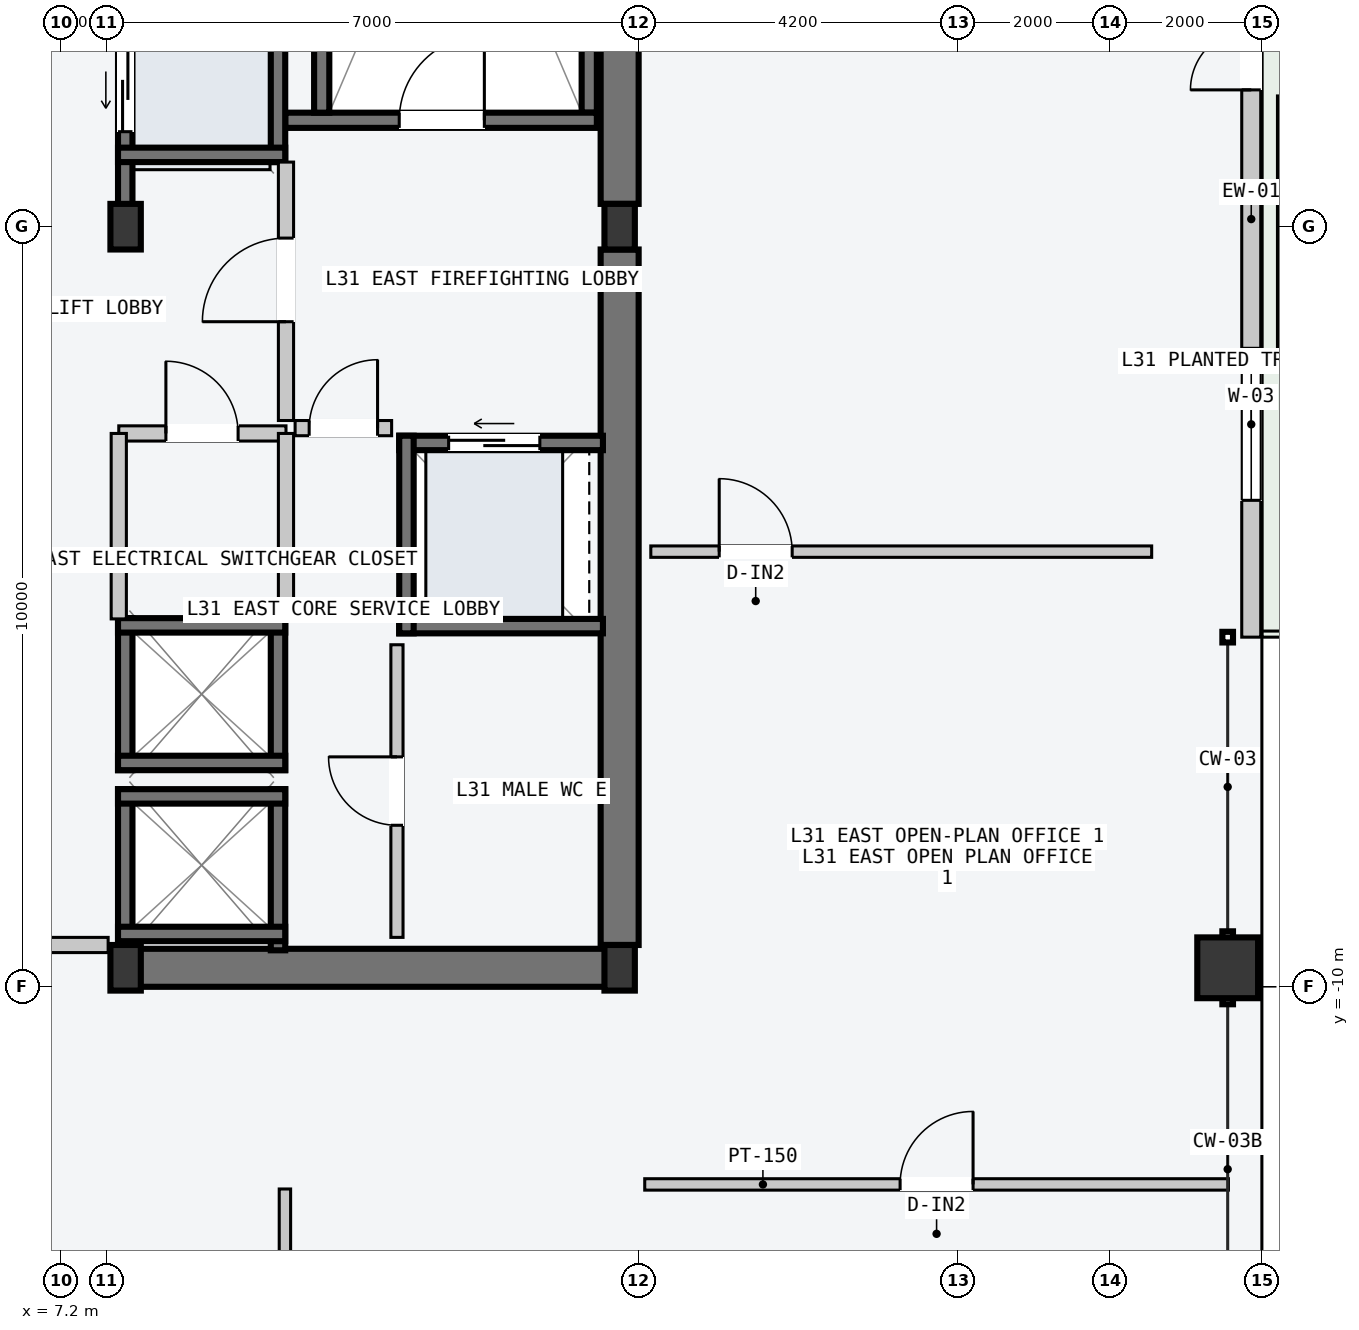
"""IFC4 building model, lengths in metres.
Left out: names, types, materials, properties, quantities, classifications, styles, units other than length and angle.
Written with IfcOpenShell. Run it as: python <this file> out.ifc"""

import sys

from ifc_helpers import new_model, si_unit, direction, frame, frame_2d, origin, origin_2d, place, context, subcontext, project, spatial, rectangle, hollow_rectangle, i_section, extrude, element, fill, save


model = new_model("IFC4")
c1 = context("Model", 3, precision=1e-05, world=origin(), true_north=direction((0.0, 1.0)))
c2 = subcontext(c1, "Body", "Model", "MODEL_VIEW")
j1 = project(units=[si_unit("LENGTHUNIT", "METRE"), si_unit("PLANEANGLEUNIT", "RADIAN")], contexts=[c1])
p1 = place(None, origin())
s1 = spatial("IfcSite", under=j1, at=p1, CompositionType="ELEMENT")
p2 = place(p1, origin())
s2 = spatial("IfcBuilding", under=s1, at=p2, CompositionType="ELEMENT")
p3 = place(p2, frame((0.0, 0.0, 120.6)))
s3 = spatial("IfcBuildingStorey", under=s2, at=p3, CompositionType="ELEMENT", Elevation=120.6)
p4 = place(p3, frame((8.07, -9.75, -0.2), z_axis=(0.0, 0.0, 1.0), x_axis=(1.0, 0.0, 0.0)))
e1 = element("IfcWall", 1, at=p4, inside=s3, PredefinedType="SHEAR", context=c2, shape_type="SweptSolid", body=[
    extrude(rectangle(XDim=6.46, YDim=0.5, at=frame_2d((3.23, 0.0))), origin(), (0.0, 0.0, 1.0), 3.6),
])
for number, where, z_axis, x_axis in (
    (2, (14.55, -9.45, -0.2), (0.0, 0.0, 1.0), (0.0, 1.0, 0.0)),
    (3, (14.55, 0.3, -0.2), (0.0, 0.0, 1.0), (0.0, 1.0, 0.0)),
):
    element("IfcWall", number, at=place(p3, frame(where, z_axis=z_axis, x_axis=x_axis)), inside=s3, PredefinedType="SHEAR", context=c2, shape_type="SweptSolid", body=[
        extrude(rectangle(XDim=9.15, YDim=0.5, at=frame_2d((4.575, 0.0))), origin(), (0.0, 0.0, 1.0), 3.6),
    ])
p5 = place(p3, frame((14.15, 1.5, -0.2), z_axis=(0.0, 0.0, 1.0), x_axis=(0.0, 1.0, 0.0)))
e4 = element("IfcWall", 4, at=p5, inside=s3, PredefinedType="SOLIDWALL", context=c2, shape_type="SweptSolid", body=[
    extrude(rectangle(XDim=7.8, YDim=0.2, at=frame_2d((3.9, 0.0))), origin(), (0.0, 0.0, 1.0), 3.6),
])
p6 = place(p3, frame((10.15, 1.4, -0.2), z_axis=(0.0, 0.0, 1.0), x_axis=(1.0, 0.0, 0.0)))
e5 = element("IfcWall", 5, at=p6, inside=s3, PredefinedType="SOLIDWALL", context=c2, shape_type="SweptSolid", body=[
    extrude(rectangle(XDim=4.1, YDim=0.2, at=frame_2d((2.05, 0.0))), origin(), (0.0, 0.0, 1.0), 3.6),
])
p7 = place(p6, frame((1.5, 0.0, 0.2)))
e6 = element("IfcOpeningElement", 6, at=p7, cuts=e5, PredefinedType="OPENING", context=c2, shape_type="SweptSolid", body=[
    extrude(rectangle(XDim=1.12, YDim=2.18, at=frame_2d((0.56, 1.09))), frame((0.0, 0.11, 0.0), z_axis=(0.0, -1.0, 0.0), x_axis=(1.0, 0.0, 0.0)), (0.0, 0.0, 1.0), 0.22),
])
p8 = place(p3, frame((10.63, 1.5, -0.2), z_axis=(0.0, 0.0, 1.0), x_axis=(0.0, 1.0, 0.0)))
e7 = element("IfcWall", 7, at=p8, inside=s3, PredefinedType="SOLIDWALL", context=c2, shape_type="SweptSolid", body=[
    extrude(rectangle(XDim=7.8, YDim=0.2, at=frame_2d((3.9, 0.0))), origin(), (0.0, 0.0, 1.0), 3.6),
])
for number, where, z_axis, x_axis in (
    (8, (8.05, -9.75, 0.0), (0.0, 0.0, 1.0), (1.0, 0.0, 0.0)),
    (9, (8.05, 0.0, 0.0), (0.0, 0.0, 1.0), (1.0, 0.0, 0.0)),
    (10, (14.55, -9.75, 0.0), (0.0, 0.0, 1.0), (1.0, 0.0, 0.0)),
    (11, (14.55, 0.0, 0.0), (0.0, 0.0, 1.0), (1.0, 0.0, 0.0)),
):
    element("IfcColumn", number, at=place(p3, frame(where, z_axis=z_axis, x_axis=x_axis)), inside=s3, PredefinedType="COLUMN", context=c2, shape_type="SweptSolid", body=[
        extrude(i_section(OverallWidth=0.4, OverallDepth=0.6, WebThickness=0.022, FlangeThickness=0.036, at=origin_2d()), origin(), (0.0, 0.0, 1.0), 3.6),
    ])
p9 = place(p3, frame((22.55, -9.75, 0.0), z_axis=(0.0, 0.0, 1.0), x_axis=(0.0, 1.0, 0.0)))
e12 = element("IfcColumn", 12, at=p9, inside=s3, PredefinedType="COLUMN", context=c2, shape_type="SweptSolid", body=[
    extrude(hollow_rectangle(XDim=0.8, YDim=0.8, WallThickness=0.036, at=origin_2d()), origin(), (0.0, 0.0, 1.0), 3.6),
])
p10 = place(p3, frame((22.86, -5.4, 0.0), z_axis=(0.0, 0.0, 1.0), x_axis=(0.0, 1.0, 0.0)))
e13 = element("IfcWall", 13, at=p10, inside=s3, PredefinedType="STANDARD", context=c2, shape_type="SweptSolid", body=[
    extrude(rectangle(XDim=10.8, YDim=0.25, at=frame_2d((5.4, 0.0))), origin(), (0.0, 0.0, 1.0), 3.4),
])
p11 = place(p10, frame((7.2, 0.0, 0.0)))
e14 = element("IfcOpeningElement", 14, at=p11, cuts=e13, PredefinedType="OPENING", context=c2, shape_type="SweptSolid", body=[
    extrude(rectangle(XDim=1.6, YDim=2.2, at=frame_2d((0.8, 1.1))), frame((0.0, 0.135, 0.0), z_axis=(0.0, -1.0, 0.0), x_axis=(1.0, 0.0, 0.0)), (0.0, 0.0, 1.0), 0.27),
])
p12 = place(p10, frame((1.8, 0.0, 0.85)))
e15 = element("IfcOpeningElement", 15, at=p12, cuts=e13, PredefinedType="OPENING", context=c2, shape_type="SweptSolid", body=[
    extrude(rectangle(XDim=2.0, YDim=2.1, at=frame_2d((1.0, 1.05))), frame((0.0, 0.135, 0.0), z_axis=(0.0, -1.0, 0.0), x_axis=(1.0, 0.0, 0.0)), (0.0, 0.0, 1.0), 0.27),
])
p13 = place(p3, frame((8.045, 0.21, -0.2), z_axis=(0.0, 0.0, 1.0), x_axis=(0.0, 1.0, 0.0)))
e16 = element("IfcWall", 16, at=p13, inside=s3, PredefinedType="SOLIDWALL", context=c2, shape_type="SweptSolid", body=[
    extrude(rectangle(XDim=2.54, YDim=0.19, at=frame_2d((1.27, 0.0))), origin(), (0.0, 0.0, 1.0), 3.6),
])
p14 = place(p13, frame((1.04, 0.0, 0.2)))
e17 = element("IfcOpeningElement", 17, at=p14, cuts=e16, PredefinedType="OPENING", context=c2, shape_type="SweptSolid", body=[
    extrude(rectangle(XDim=1.1, YDim=2.2, at=frame_2d((0.55, 1.1))), frame((0.0, 0.105, 0.0), z_axis=(0.0, -1.0, 0.0), x_axis=(1.0, 0.0, 0.0)), (0.0, 0.0, 1.0), 0.21),
])
p15 = place(p3, frame((10.055, 0.85, -0.2), z_axis=(0.0, 0.0, 1.0), x_axis=(0.0, 1.0, 0.0)))
e18 = element("IfcWall", 18, at=p15, inside=s3, PredefinedType="SOLIDWALL", context=c2, shape_type="SweptSolid", body=[
    extrude(rectangle(XDim=1.9, YDim=0.19, at=frame_2d((0.95, 0.0))), origin(), (0.0, 0.0, 1.0), 3.6),
])
p16 = place(p3, frame((7.95, 0.945, -0.2), z_axis=(0.0, 0.0, 1.0), x_axis=(1.0, 0.0, 0.0)))
e19 = element("IfcWall", 19, at=p16, inside=s3, PredefinedType="SOLIDWALL", context=c2, shape_type="SweptSolid", body=[
    extrude(rectangle(XDim=2.2, YDim=0.19, at=frame_2d((1.1, 0.0))), origin(), (0.0, 0.0, 1.0), 3.6),
])
for number, where, z_axis, x_axis in (
    (20, (8.045, -9.52, -0.2), (0.0, 0.0, 1.0), (0.0, 1.0, 0.0)),
    (21, (10.055, -9.52, -0.2), (0.0, 0.0, 1.0), (0.0, 1.0, 0.0)),
):
    element("IfcWall", number, at=place(p3, frame(where, z_axis=z_axis, x_axis=x_axis)), inside=s3, PredefinedType="SOLIDWALL", context=c2, shape_type="SweptSolid", body=[
        extrude(rectangle(XDim=2.12, YDim=0.19, at=frame_2d((1.06, 0.0))), origin(), (0.0, 0.0, 1.0), 3.6),
    ])
for number, where, z_axis, x_axis in (
    (22, (7.95, -7.495, -0.2), (0.0, 0.0, 1.0), (1.0, 0.0, 0.0)),
    (23, (7.95, -9.305, -0.2), (0.0, 0.0, 1.0), (1.0, 0.0, 0.0)),
):
    element("IfcWall", number, at=place(p3, frame(where, z_axis=z_axis, x_axis=x_axis)), inside=s3, PredefinedType="SOLIDWALL", context=c2, shape_type="SweptSolid", body=[
        extrude(rectangle(XDim=2.2, YDim=0.19, at=frame_2d((1.1, 0.0))), origin(), (0.0, 0.0, 1.0), 3.6),
    ])
for number, where, z_axis, x_axis in (
    (24, (8.045, -7.15, -0.2), (0.0, 0.0, 1.0), (0.0, 1.0, 0.0)),
    (25, (10.055, -7.15, -0.2), (0.0, 0.0, 1.0), (0.0, 1.0, 0.0)),
):
    element("IfcWall", number, at=place(p3, frame(where, z_axis=z_axis, x_axis=x_axis)), inside=s3, PredefinedType="SOLIDWALL", context=c2, shape_type="SweptSolid", body=[
        extrude(rectangle(XDim=2.0, YDim=0.19, at=frame_2d((1.0, 0.0))), origin(), (0.0, 0.0, 1.0), 3.6),
    ])
for number, where, z_axis, x_axis in (
    (26, (7.95, -5.245, -0.2), (0.0, 0.0, 1.0), (1.0, 0.0, 0.0)),
    (27, (7.95, -7.055, -0.2), (0.0, 0.0, 1.0), (1.0, 0.0, 0.0)),
):
    element("IfcWall", number, at=place(p3, frame(where, z_axis=z_axis, x_axis=x_axis)), inside=s3, PredefinedType="SOLIDWALL", context=c2, shape_type="SweptSolid", body=[
        extrude(rectangle(XDim=2.2, YDim=0.19, at=frame_2d((1.1, 0.0))), origin(), (0.0, 0.0, 1.0), 3.6),
    ])
p17 = place(p3, frame((11.65, -2.845, -0.2), z_axis=(0.0, 0.0, 1.0), x_axis=(1.0, 0.0, 0.0)))
e28 = element("IfcWall", 28, at=p17, inside=s3, PredefinedType="SOLIDWALL", context=c2, shape_type="SweptSolid", body=[
    extrude(rectangle(XDim=2.68, YDim=0.19, at=frame_2d((1.34, 0.0))), origin(), (0.0, 0.0, 1.0), 3.6),
])
p18 = place(p17, frame((0.65, 0.0, 0.2)))
e29 = element("IfcOpeningElement", 29, at=p18, cuts=e28, PredefinedType="OPENING", context=c2, shape_type="SweptSolid", body=[
    extrude(rectangle(XDim=1.2, YDim=2.2, at=frame_2d((0.6, 1.1))), frame((0.0, 0.105, 0.0), z_axis=(0.0, -1.0, 0.0), x_axis=(1.0, 0.0, 0.0)), (0.0, 0.0, 1.0), 0.21),
])
p19 = place(p3, frame((11.65, -5.255, -0.2), z_axis=(0.0, 0.0, 1.0), x_axis=(1.0, 0.0, 0.0)))
e30 = element("IfcWall", 30, at=p19, inside=s3, PredefinedType="SOLIDWALL", context=c2, shape_type="SweptSolid", body=[
    extrude(rectangle(XDim=2.68, YDim=0.19, at=frame_2d((1.34, 0.0))), origin(), (0.0, 0.0, 1.0), 3.6),
])
p20 = place(p3, frame((11.745, -5.35, -0.2), z_axis=(0.0, 0.0, 1.0), x_axis=(0.0, 1.0, 0.0)))
e31 = element("IfcWall", 31, at=p20, inside=s3, PredefinedType="SOLIDWALL", context=c2, shape_type="SweptSolid", body=[
    extrude(rectangle(XDim=2.6, YDim=0.19, at=frame_2d((1.3, 0.0))), origin(), (0.0, 0.0, 1.0), 3.6),
])
p21 = place(p3, frame((6.02, -9.45, 0.0), z_axis=(0.0, 0.0, 1.0), x_axis=(1.0, 0.0, 0.0)))
e32 = element("IfcWall", 32, at=p21, inside=s3, PredefinedType="PARTITIONING", context=c2, shape_type="SweptSolid", body=[
    extrude(rectangle(XDim=1.8, YDim=0.2, at=frame_2d((0.9, 0.0))), origin(), (0.0, 0.0, 1.0), 3.4),
])
p22 = place(p3, frame((10.16, -2.55, 0.0), z_axis=(0.0, 0.0, 1.0), x_axis=(0.0, 1.0, 0.0)))
e33 = element("IfcWall", 33, at=p22, inside=s3, PredefinedType="PARTITIONING", context=c2, shape_type="SweptSolid", body=[
    extrude(rectangle(XDim=3.4, YDim=0.2, at=frame_2d((1.7, 0.0))), origin(), (0.0, 0.0, 1.0), 3.4),
])
p23 = place(p22, frame((1.3, 0.0, 0.0)))
e34 = element("IfcOpeningElement", 34, at=p23, cuts=e33, PredefinedType="OPENING", context=c2, shape_type="SweptSolid", body=[
    extrude(rectangle(XDim=1.1, YDim=2.15, at=frame_2d((0.55, 1.075))), frame((0.0, 0.11, 0.0), z_axis=(0.0, -1.0, 0.0), x_axis=(1.0, 0.0, 0.0)), (0.0, 0.0, 1.0), 0.22),
])
p24 = place(p3, frame((10.28, -2.65, 0.0), z_axis=(0.0, 0.0, 1.0), x_axis=(1.0, 0.0, 0.0)))
e35 = element("IfcWall", 35, at=p24, inside=s3, PredefinedType="PARTITIONING", context=c2, shape_type="SweptSolid", body=[
    extrude(rectangle(XDim=1.27, YDim=0.2, at=frame_2d((0.635, 0.0))), origin(), (0.0, 0.0, 1.0), 3.4),
])
p25 = place(p24, frame((0.185, 0.0, 0.0)))
e36 = element("IfcOpeningElement", 36, at=p25, cuts=e35, PredefinedType="OPENING", context=c2, shape_type="SweptSolid", body=[
    extrude(rectangle(XDim=0.9, YDim=2.15, at=frame_2d((0.45, 1.075))), frame((0.0, 0.11, 0.0), z_axis=(0.0, -1.0, 0.0), x_axis=(1.0, 0.0, 0.0)), (0.0, 0.0, 1.0), 0.22),
])
p26 = place(p3, frame((7.96, -2.72, 0.0), z_axis=(0.0, 0.0, 1.0), x_axis=(1.0, 0.0, 0.0)))
e37 = element("IfcWall", 37, at=p26, inside=s3, PredefinedType="PARTITIONING", context=c2, shape_type="SweptSolid", body=[
    extrude(rectangle(XDim=2.2, YDim=0.2, at=frame_2d((1.1, 0.0))), origin(), (0.0, 0.0, 1.0), 3.4),
])
p27 = place(p26, frame((0.62, 0.0, 0.0)))
e38 = element("IfcOpeningElement", 38, at=p27, cuts=e37, PredefinedType="OPENING", context=c2, shape_type="SweptSolid", body=[
    extrude(rectangle(XDim=0.95, YDim=2.1, at=frame_2d((0.475, 1.05))), frame((0.0, 0.11, 0.0), z_axis=(0.0, -1.0, 0.0), x_axis=(1.0, 0.0, 0.0)), (0.0, 0.0, 1.0), 0.22),
])
for number, where, z_axis, x_axis in (
    (39, (7.96, -5.16, 0.0), (0.0, 0.0, 1.0), (0.0, 1.0, 0.0)),
    (40, (10.16, -5.16, 0.0), (0.0, 0.0, 1.0), (0.0, 1.0, 0.0)),
):
    element("IfcWall", number, at=place(p3, frame(where, z_axis=z_axis, x_axis=x_axis)), inside=s3, PredefinedType="PARTITIONING", context=c2, shape_type="SweptSolid", body=[
        extrude(rectangle(XDim=2.44, YDim=0.2, at=frame_2d((1.22, 0.0))), origin(), (0.0, 0.0, 1.0), 3.4),
    ])
p28 = place(p3, frame((11.62, -9.35, 0.0), z_axis=(0.0, 0.0, 1.0), x_axis=(0.0, 1.0, 0.0)))
e41 = element("IfcWall", 41, at=p28, inside=s3, PredefinedType="PARTITIONING", context=c2, shape_type="SweptSolid", body=[
    extrude(rectangle(XDim=3.85, YDim=0.16, at=frame_2d((1.925, 0.0))), origin(), (0.0, 0.0, 1.0), 3.4),
])
p29 = place(p28, frame((1.475, 0.0, 0.0)))
e42 = element("IfcOpeningElement", 42, at=p29, cuts=e41, PredefinedType="OPENING", context=c2, shape_type="SweptSolid", body=[
    extrude(rectangle(XDim=0.9, YDim=2.15, at=frame_2d((0.45, 1.075))), frame((0.0, 0.09, 0.0), z_axis=(0.0, -1.0, 0.0), x_axis=(1.0, 0.0, 0.0)), (0.0, 0.0, 1.0), 0.18),
])
p30 = place(p3, frame((10.146, -19.56, 0.0), z_axis=(0.0, 0.0, 1.0), x_axis=(0.0, 1.0, 0.0)))
e43 = element("IfcWall", 43, at=p30, inside=s3, PredefinedType="PARTITIONING", context=c2, shape_type="SweptSolid", body=[
    extrude(rectangle(XDim=6.9, YDim=0.15, at=frame_2d((3.45, 0.0))), origin(), (0.0, 0.0, 1.0), 3.4),
])
p31 = place(p30, frame((1.05, 0.0, 0.0)))
e44 = element("IfcOpeningElement", 44, at=p31, cuts=e43, PredefinedType="OPENING", context=c2, shape_type="SweptSolid", body=[
    extrude(rectangle(XDim=0.96, YDim=2.18, at=frame_2d((0.48, 1.09))), frame((0.0, 0.085, 0.0), z_axis=(0.0, -1.0, 0.0), x_axis=(1.0, 0.0, 0.0)), (0.0, 0.0, 1.0), 0.17),
])
p32 = place(p3, frame((14.88, -12.6, 0.0), z_axis=(0.0, 0.0, 1.0), x_axis=(1.0, 0.0, 0.0)))
e45 = element("IfcWall", 45, at=p32, inside=s3, PredefinedType="PARTITIONING", context=c2, shape_type="SweptSolid", body=[
    extrude(rectangle(XDim=7.68, YDim=0.15, at=frame_2d((3.84, 0.0))), origin(), (0.0, 0.0, 1.0), 3.4),
])
p33 = place(p32, frame((3.36, 0.0, 0.0)))
e46 = element("IfcOpeningElement", 46, at=p33, cuts=e45, PredefinedType="OPENING", context=c2, shape_type="SweptSolid", body=[
    extrude(rectangle(XDim=0.96, YDim=2.18, at=frame_2d((0.48, 1.09))), frame((0.0, 0.085, 0.0), z_axis=(0.0, -1.0, 0.0), x_axis=(1.0, 0.0, 0.0)), (0.0, 0.0, 1.0), 0.17),
])
p34 = place(p3, frame((14.96, -4.275, 0.0), z_axis=(0.0, 0.0, 1.0), x_axis=(1.0, 0.0, 0.0)))
e47 = element("IfcWall", 47, at=p34, inside=s3, PredefinedType="PARTITIONING", context=c2, shape_type="SweptSolid", body=[
    extrude(rectangle(XDim=6.59, YDim=0.15, at=frame_2d((3.295, 0.0))), origin(), (0.0, 0.0, 1.0), 3.4),
])
p35 = place(p34, frame((0.9, 0.0, 0.0)))
e48 = element("IfcOpeningElement", 48, at=p35, cuts=e47, PredefinedType="OPENING", context=c2, shape_type="SweptSolid", body=[
    extrude(rectangle(XDim=0.96, YDim=2.18, at=frame_2d((0.48, 1.09))), frame((0.0, 0.085, 0.0), z_axis=(0.0, -1.0, 0.0), x_axis=(1.0, 0.0, 0.0)), (0.0, 0.0, 1.0), 0.17),
])
p36 = place(p7, origin())
e49 = element("IfcDoor", 49, at=p36, inside=s3, OperationType="SINGLE_SWING_RIGHT", PredefinedType="DOOR", context=c2, shape_type="SweptSolid", body=[
    extrude(rectangle(XDim=1.12, YDim=2.18, at=frame_2d((0.56, 1.09))), frame((0.0, 0.025, 0.0), z_axis=(0.0, -1.0, 0.0), x_axis=(1.0, 0.0, 0.0)), (0.0, 0.0, 1.0), 0.05),
])
fill(e6, e49)
p37 = place(p11, origin())
e50 = element("IfcDoor", 50, at=p37, inside=s3, OperationType="DOUBLE_DOOR_SINGLE_SWING", PredefinedType="DOOR", context=c2, shape_type="SweptSolid", body=[
    extrude(rectangle(XDim=1.6, YDim=2.2, at=frame_2d((0.8, 1.1))), frame((0.0, 0.025, 0.0), z_axis=(0.0, -1.0, 0.0), x_axis=(1.0, 0.0, 0.0)), (0.0, 0.0, 1.0), 0.05),
])
fill(e14, e50)
p38 = place(p12, origin())
e51 = element("IfcWindow", 51, at=p38, inside=s3, PartitioningType="SINGLE_PANEL", PredefinedType="WINDOW", context=c2, shape_type="SweptSolid", body=[
    extrude(rectangle(XDim=2.0, YDim=2.1, at=frame_2d((1.0, 1.05))), frame((0.0, 0.03, 0.0), z_axis=(0.0, -1.0, 0.0), x_axis=(1.0, 0.0, 0.0)), (0.0, 0.0, 1.0), 0.06),
])
fill(e15, e51)
p39 = place(p14, origin())
e52 = element("IfcDoor", 52, at=p39, inside=s3, OperationType="SLIDING_TO_LEFT", PredefinedType="DOOR", context=c2, shape_type="SweptSolid", body=[
    extrude(rectangle(XDim=1.1, YDim=2.2, at=frame_2d((0.55, 1.1))), frame((0.0, 0.025, 0.0), z_axis=(0.0, -1.0, 0.0), x_axis=(1.0, 0.0, 0.0)), (0.0, 0.0, 1.0), 0.05),
])
fill(e17, e52)
p40 = place(p18, origin())
e53 = element("IfcDoor", 53, at=p40, inside=s3, OperationType="SLIDING_TO_LEFT", PredefinedType="DOOR", context=c2, shape_type="SweptSolid", body=[
    extrude(rectangle(XDim=1.2, YDim=2.2, at=frame_2d((0.6, 1.1))), frame((0.0, 0.025, 0.0), z_axis=(0.0, -1.0, 0.0), x_axis=(1.0, 0.0, 0.0)), (0.0, 0.0, 1.0), 0.05),
])
fill(e29, e53)
p41 = place(p23, origin())
e54 = element("IfcDoor", 54, at=p41, inside=s3, OperationType="SINGLE_SWING_LEFT", PredefinedType="DOOR", context=c2, shape_type="SweptSolid", body=[
    extrude(rectangle(XDim=1.1, YDim=2.15, at=frame_2d((0.55, 1.075))), frame((0.0, 0.025, 0.0), z_axis=(0.0, -1.0, 0.0), x_axis=(1.0, 0.0, 0.0)), (0.0, 0.0, 1.0), 0.05),
])
fill(e34, e54)
p42 = place(p25, origin())
e55 = element("IfcDoor", 55, at=p42, inside=s3, OperationType="SINGLE_SWING_RIGHT", PredefinedType="DOOR", context=c2, shape_type="SweptSolid", body=[
    extrude(rectangle(XDim=0.9, YDim=2.15, at=frame_2d((0.45, 1.075))), frame((0.0, 0.025, 0.0), z_axis=(0.0, -1.0, 0.0), x_axis=(1.0, 0.0, 0.0)), (0.0, 0.0, 1.0), 0.05),
])
fill(e36, e55)
p43 = place(p27, origin())
e56 = element("IfcDoor", 56, at=p43, inside=s3, OperationType="SINGLE_SWING_LEFT", PredefinedType="DOOR", context=c2, shape_type="SweptSolid", body=[
    extrude(rectangle(XDim=0.95, YDim=2.1, at=frame_2d((0.475, 1.05))), frame((0.0, 0.025, 0.0), z_axis=(0.0, -1.0, 0.0), x_axis=(1.0, 0.0, 0.0)), (0.0, 0.0, 1.0), 0.05),
])
fill(e38, e56)
p44 = place(p29, origin())
e57 = element("IfcDoor", 57, at=p44, inside=s3, OperationType="SINGLE_SWING_RIGHT", PredefinedType="DOOR", context=c2, shape_type="SweptSolid", body=[
    extrude(rectangle(XDim=0.9, YDim=2.15, at=frame_2d((0.45, 1.075))), frame((0.0, 0.025, 0.0), z_axis=(0.0, -1.0, 0.0), x_axis=(1.0, 0.0, 0.0)), (0.0, 0.0, 1.0), 0.05),
])
fill(e42, e57)
p45 = place(p33, origin())
e58 = element("IfcDoor", 58, at=p45, inside=s3, OperationType="SINGLE_SWING_RIGHT", PredefinedType="DOOR", context=c2, shape_type="SweptSolid", body=[
    extrude(rectangle(XDim=0.96, YDim=2.18, at=frame_2d((0.48, 1.09))), frame((0.0, 0.025, 0.0), z_axis=(0.0, -1.0, 0.0), x_axis=(1.0, 0.0, 0.0)), (0.0, 0.0, 1.0), 0.05),
])
fill(e46, e58)
p46 = place(p35, origin())
e59 = element("IfcDoor", 59, at=p46, inside=s3, OperationType="SINGLE_SWING_LEFT", PredefinedType="DOOR", context=c2, shape_type="SweptSolid", body=[
    extrude(rectangle(XDim=0.96, YDim=2.18, at=frame_2d((0.48, 1.09))), frame((0.0, 0.025, 0.0), z_axis=(0.0, -1.0, 0.0), x_axis=(1.0, 0.0, 0.0)), (0.0, 0.0, 1.0), 0.05),
])
fill(e48, e59)
save(model, sys.argv[1])
